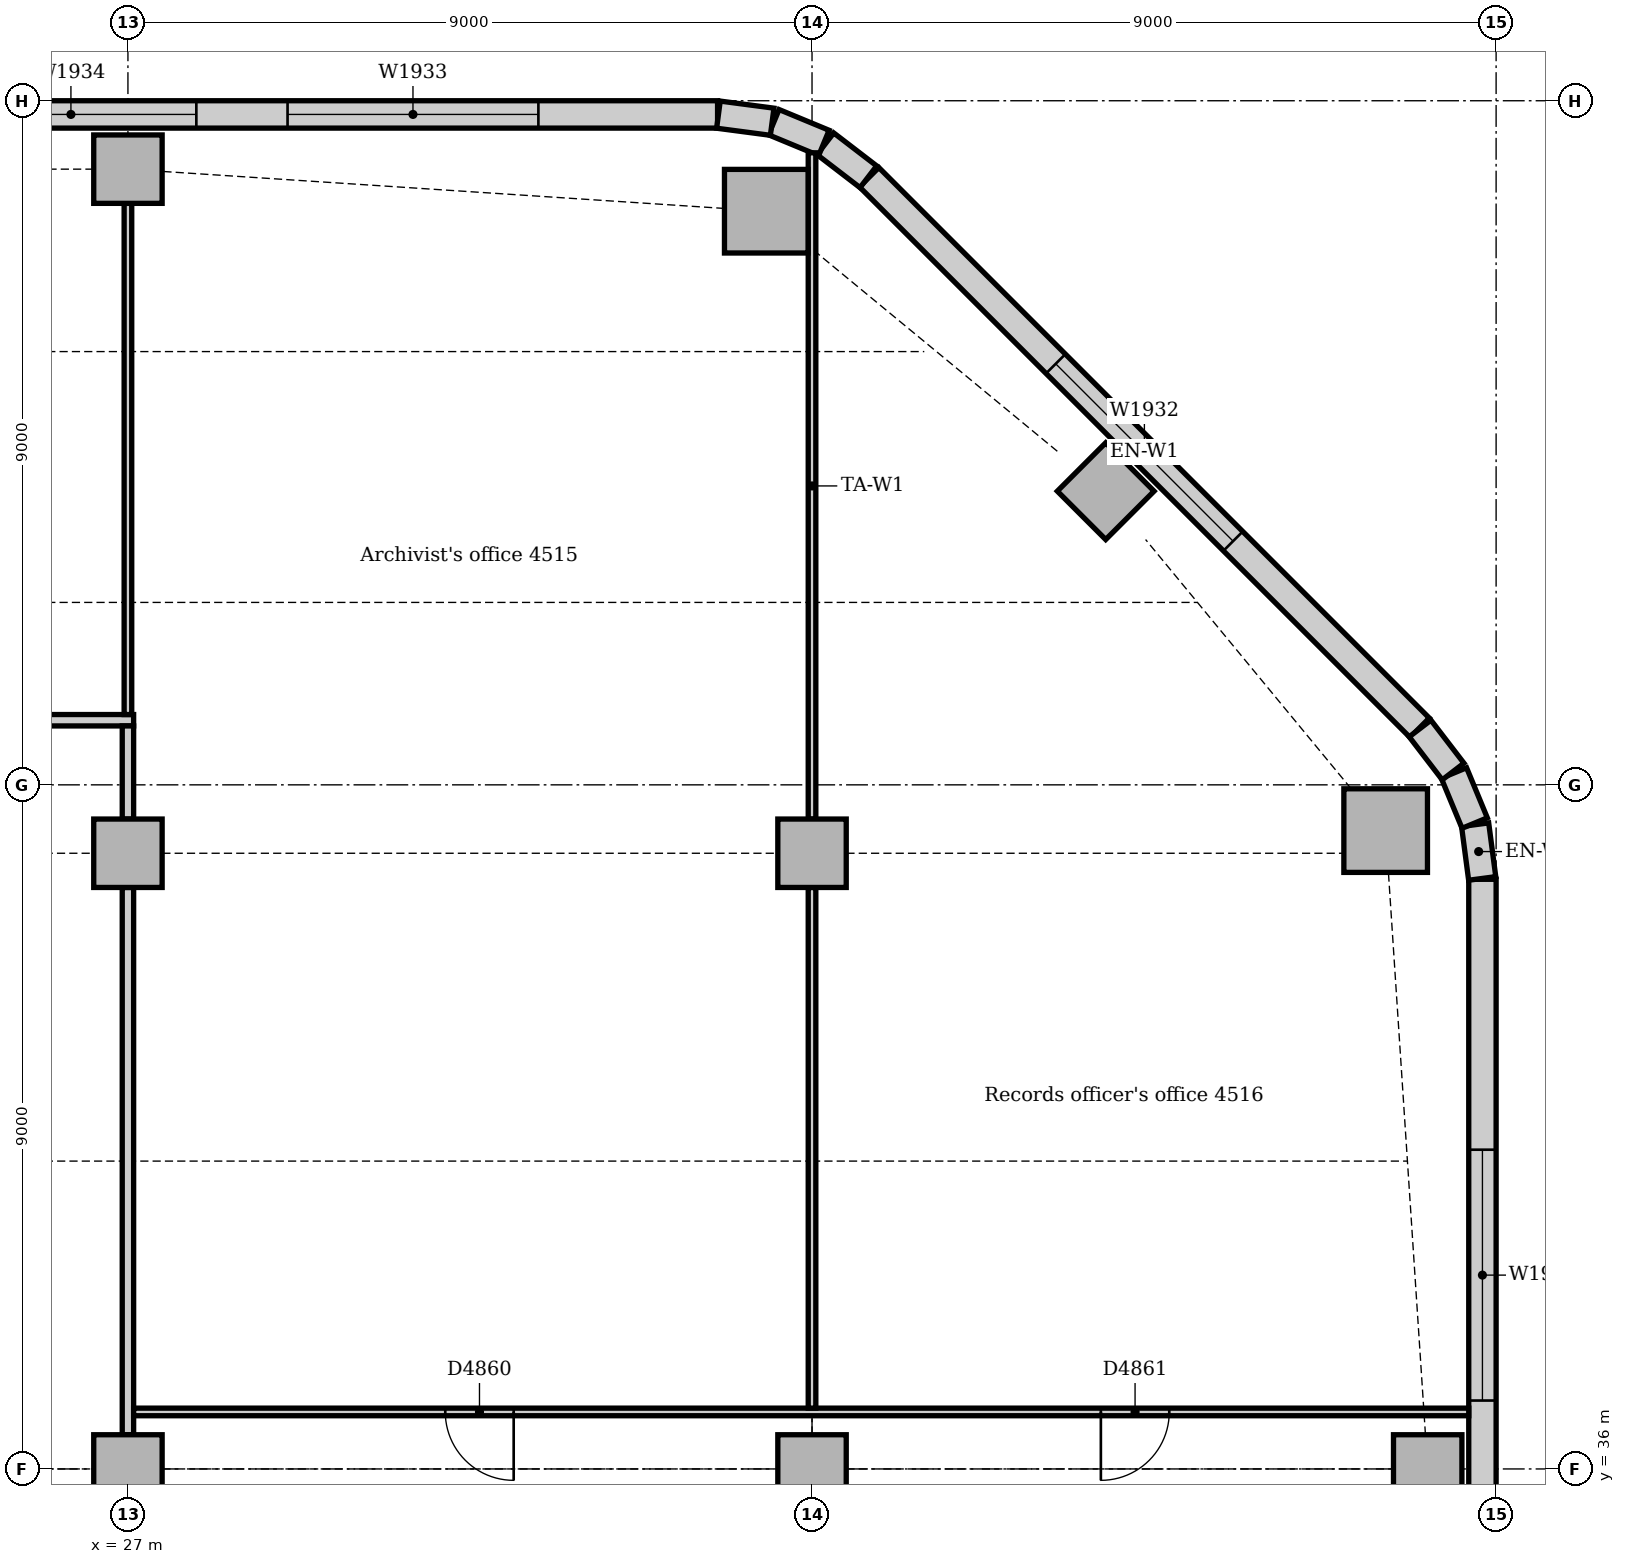
"""IFC4 building model, lengths in metres.
Left out: names, types, materials, properties, quantities, classifications, styles, units other than length and angle.
Written with IfcOpenShell. Run it as: python <this file> out.ifc"""

import sys

from ifc_helpers import new_model, si_unit, direction, frame, frame_2d, origin, origin_2d, place, context, subcontext, project, spatial, rectangle, extrude, element, fill, save


model = new_model("IFC4")
c1 = context("Model", 3, precision=1e-05, world=origin(), true_north=direction((0.0, 1.0)))
c2 = subcontext(c1, "Body", "Model", "MODEL_VIEW")
j1 = project(units=[si_unit("LENGTHUNIT", "METRE"), si_unit("PLANEANGLEUNIT", "RADIAN")], contexts=[c1])
p1 = place(None, origin())
s1 = spatial("IfcSite", under=j1, at=p1, CompositionType="ELEMENT")
p2 = place(p1, origin())
s2 = spatial("IfcBuilding", under=s1, at=p2, CompositionType="ELEMENT")
p3 = place(p2, frame((0.0, 0.0, 189.0)))
s3 = spatial("IfcBuildingStorey", under=s2, at=p3, CompositionType="ELEMENT", Elevation=189.0)
for number, where, z_axis, x_axis in (
    (1, (43.547, 44.398, 0.0), (0.0, 0.0, 1.0), (1.0, 0.0, 0.0)),
    (2, (35.398, 52.547, 0.0), (0.0, 0.0, 1.0), (1.0, 0.0, 0.0)),
):
    element("IfcColumn", number, at=place(p3, frame(where, z_axis=z_axis, x_axis=x_axis)), inside=s3, PredefinedType="COLUMN", context=c2, shape_type="SweptSolid", body=[
        extrude(rectangle(XDim=1.1, YDim=1.1, at=origin_2d()), origin(), (0.0, 0.0, 1.0), 3.7),
    ])
for number, where, z_axis, x_axis in (
    (3, (44.1, 36.0, 0.0), (0.0, 0.0, 1.0), (1.0, 0.0, 0.0)),
    (4, (39.864, 48.864, 0.0), (0.0, 0.0, 1.0), (0.707, 0.707, 0.0)),
    (5, (27.0, 53.1, 0.0), (0.0, 0.0, 1.0), (1.0, 0.0, 0.0)),
    (6, (27.0, 36.0, 0.0), (0.0, 0.0, 1.0), (1.0, 0.0, 0.0)),
    (7, (27.0, 44.1, 0.0), (0.0, 0.0, 1.0), (1.0, 0.0, 0.0)),
    (8, (36.0, 36.0, 0.0), (0.0, 0.0, 1.0), (1.0, 0.0, 0.0)),
    (9, (36.0, 44.1, 0.0), (0.0, 0.0, 1.0), (1.0, 0.0, 0.0)),
):
    element("IfcColumn", number, at=place(p3, frame(where, z_axis=z_axis, x_axis=x_axis)), inside=s3, PredefinedType="COLUMN", context=c2, shape_type="SweptSolid", body=[
        extrude(rectangle(XDim=0.9, YDim=0.9, at=origin_2d()), origin(), (0.0, 0.0, 1.0), 3.7),
    ])
p4 = place(p3, frame((44.82, 19.243, 0.0), z_axis=(0.0, 0.0, 1.0), x_axis=(0.0, 1.0, 0.0)))
e10 = element("IfcWall", 10, at=p4, inside=s3, PredefinedType="STANDARD", context=c2, shape_type="SweptSolid", body=[
    extrude(rectangle(XDim=24.515, YDim=0.36, at=frame_2d((12.257, 0.0))), origin(), (0.0, 0.0, 1.0), 3.7),
])
p5 = place(p4, frame((3.507, 0.0, 0.9)))
e11 = element("IfcOpeningElement", 11, at=p5, cuts=e10, PredefinedType="OPENING", context=c2, shape_type="SweptSolid", body=[
    extrude(rectangle(XDim=3.3, YDim=1.6, at=frame_2d((1.65, 0.8))), frame((0.0, 0.19, 0.0), z_axis=(0.0, -1.0, 0.0), x_axis=(1.0, 0.0, 0.0)), (0.0, 0.0, 1.0), 0.38),
])
p6 = place(p4, frame((8.357, 0.0, 0.9)))
e12 = element("IfcOpeningElement", 12, at=p6, cuts=e10, PredefinedType="OPENING", context=c2, shape_type="SweptSolid", body=[
    extrude(rectangle(XDim=3.3, YDim=1.6, at=frame_2d((1.65, 0.8))), frame((0.0, 0.19, 0.0), z_axis=(0.0, -1.0, 0.0), x_axis=(1.0, 0.0, 0.0)), (0.0, 0.0, 1.0), 0.38),
])
p7 = place(p4, frame((12.857, 0.0, 0.9)))
e13 = element("IfcOpeningElement", 13, at=p7, cuts=e10, PredefinedType="OPENING", context=c2, shape_type="SweptSolid", body=[
    extrude(rectangle(XDim=3.3, YDim=1.6, at=frame_2d((1.65, 0.8))), frame((0.0, 0.19, 0.0), z_axis=(0.0, -1.0, 0.0), x_axis=(1.0, 0.0, 0.0)), (0.0, 0.0, 1.0), 0.38),
])
p8 = place(p4, frame((17.657, 0.0, 0.9)))
e14 = element("IfcOpeningElement", 14, at=p8, cuts=e10, PredefinedType="OPENING", context=c2, shape_type="SweptSolid", body=[
    extrude(rectangle(XDim=3.3, YDim=1.6, at=frame_2d((1.65, 0.8))), frame((0.0, 0.19, 0.0), z_axis=(0.0, -1.0, 0.0), x_axis=(1.0, 0.0, 0.0)), (0.0, 0.0, 1.0), 0.38),
])
p9 = place(p3, frame((43.994, 45.751, 0.0), z_axis=(0.0, 0.0, 1.0), x_axis=(-0.707106781187, 0.707106781187, 0.0)))
e15 = element("IfcWall", 15, at=p9, inside=s3, PredefinedType="STANDARD", context=c2, shape_type="SweptSolid", body=[
    extrude(rectangle(XDim=10.243, YDim=0.36, at=frame_2d((5.121, 0.0))), origin(), (0.0, 0.0, 1.0), 3.7),
])
p10 = place(p9, frame((3.471, 0.0, 0.9)))
e16 = element("IfcOpeningElement", 16, at=p10, cuts=e15, PredefinedType="OPENING", context=c2, shape_type="SweptSolid", body=[
    extrude(rectangle(XDim=3.3, YDim=1.6, at=frame_2d((1.65, 0.8))), frame((0.0, 0.19, 0.0), z_axis=(0.0, -1.0, 0.0), x_axis=(1.0, 0.0, 0.0)), (0.0, 0.0, 1.0), 0.38),
])
p11 = place(p3, frame((34.757, 53.82, 0.0), z_axis=(0.0, 0.0, 1.0), x_axis=(-1.0, 0.0, 0.0)))
e17 = element("IfcWall", 17, at=p11, inside=s3, PredefinedType="STANDARD", context=c2, shape_type="SweptSolid", body=[
    extrude(rectangle(XDim=30.515, YDim=0.36, at=frame_2d((15.257, 0.0))), origin(), (0.0, 0.0, 1.0), 3.7),
])
p12 = place(p11, frame((2.357, 0.0, 0.9)))
e18 = element("IfcOpeningElement", 18, at=p12, cuts=e17, PredefinedType="OPENING", context=c2, shape_type="SweptSolid", body=[
    extrude(rectangle(XDim=3.3, YDim=1.6, at=frame_2d((1.65, 0.8))), frame((0.0, 0.19, 0.0), z_axis=(0.0, -1.0, 0.0), x_axis=(1.0, 0.0, 0.0)), (0.0, 0.0, 1.0), 0.38),
])
p13 = place(p11, frame((6.857, 0.0, 0.9)))
e19 = element("IfcOpeningElement", 19, at=p13, cuts=e17, PredefinedType="OPENING", context=c2, shape_type="SweptSolid", body=[
    extrude(rectangle(XDim=3.3, YDim=1.6, at=frame_2d((1.65, 0.8))), frame((0.0, 0.19, 0.0), z_axis=(0.0, -1.0, 0.0), x_axis=(1.0, 0.0, 0.0)), (0.0, 0.0, 1.0), 0.38),
])
p14 = place(p11, frame((11.357, 0.0, 0.9)))
e20 = element("IfcOpeningElement", 20, at=p14, cuts=e17, PredefinedType="OPENING", context=c2, shape_type="SweptSolid", body=[
    extrude(rectangle(XDim=3.3, YDim=1.6, at=frame_2d((1.65, 0.8))), frame((0.0, 0.19, 0.0), z_axis=(0.0, -1.0, 0.0), x_axis=(1.0, 0.0, 0.0)), (0.0, 0.0, 1.0), 0.38),
])
p15 = place(p11, frame((15.857, 0.0, 0.9)))
e21 = element("IfcOpeningElement", 21, at=p15, cuts=e17, PredefinedType="OPENING", context=c2, shape_type="SweptSolid", body=[
    extrude(rectangle(XDim=3.3, YDim=1.6, at=frame_2d((1.65, 0.8))), frame((0.0, 0.19, 0.0), z_axis=(0.0, -1.0, 0.0), x_axis=(1.0, 0.0, 0.0)), (0.0, 0.0, 1.0), 0.38),
])
p16 = place(p11, frame((21.457, 0.0, 0.9)))
e22 = element("IfcOpeningElement", 22, at=p16, cuts=e17, PredefinedType="OPENING", context=c2, shape_type="SweptSolid", body=[
    extrude(rectangle(XDim=1.8, YDim=1.6, at=frame_2d((0.9, 0.8))), frame((0.0, 0.19, 0.0), z_axis=(0.0, -1.0, 0.0), x_axis=(1.0, 0.0, 0.0)), (0.0, 0.0, 1.0), 0.38),
])
p17 = place(p11, frame((24.857, 0.0, 0.9)))
e23 = element("IfcOpeningElement", 23, at=p17, cuts=e17, PredefinedType="OPENING", context=c2, shape_type="SweptSolid", body=[
    extrude(rectangle(XDim=3.3, YDim=1.6, at=frame_2d((1.65, 0.8))), frame((0.0, 0.19, 0.0), z_axis=(0.0, -1.0, 0.0), x_axis=(1.0, 0.0, 0.0)), (0.0, 0.0, 1.0), 0.38),
])
for number, where, z_axis, x_axis in (
    (24, (44.817, 43.769, 0.0), (0.0, 0.0, 1.0), (-0.131, 0.991, 0.0)),
    (25, (44.718, 44.497, 0.0), (0.0, 0.0, 1.0), (-0.383, 0.924, 0.0)),
):
    element("IfcWall", number, at=place(p3, frame(where, z_axis=z_axis, x_axis=x_axis)), inside=s3, PredefinedType="STANDARD", context=c2, shape_type="SweptSolid", body=[
        extrude(rectangle(XDim=0.713, YDim=0.36, at=frame_2d((0.356, 0.0))), origin(), (0.0, 0.0, 1.0), 3.7),
    ])
for number, where, z_axis, x_axis in (
    (26, (44.434, 45.175, 0.0), (0.0, 0.0, 1.0), (-0.609, 0.793, 0.0)),
    (27, (36.741, 53.0, 0.0), (0.0, 0.0, 1.0), (-0.793, 0.609, 0.0)),
):
    element("IfcWall", number, at=place(p3, frame(where, z_axis=z_axis, x_axis=x_axis)), inside=s3, PredefinedType="STANDARD", context=c2, shape_type="SweptSolid", body=[
        extrude(rectangle(XDim=0.713, YDim=0.36, at=frame_2d((0.357, 0.0))), origin(), (0.0, 0.0, 1.0), 3.7),
    ])
for number, where, z_axis, x_axis in (
    (28, (36.156, 53.445, 0.0), (0.0, 0.0, 1.0), (-0.924, 0.383, 0.0)),
    (29, (35.476, 53.724, 0.0), (0.0, 0.0, 1.0), (-0.991, 0.131, 0.0)),
):
    element("IfcWall", number, at=place(p3, frame(where, z_axis=z_axis, x_axis=x_axis)), inside=s3, PredefinedType="STANDARD", context=c2, shape_type="SweptSolid", body=[
        extrude(rectangle(XDim=0.713, YDim=0.36, at=frame_2d((0.356, 0.0))), origin(), (0.0, 0.0, 1.0), 3.7),
    ])
p18 = place(p3, frame((1.903, 45.85, 0.0), z_axis=(0.0, 0.0, 1.0), x_axis=(1.0, 0.0, 0.0)))
e30 = element("IfcWall", 30, at=p18, inside=s3, PredefinedType="PARTITIONING", context=c2, shape_type="SweptSolid", body=[
    extrude(rectangle(XDim=25.172, YDim=0.15, at=frame_2d((12.586, 0.0))), origin(), (0.0, 0.0, 1.0), 3.7),
])
p19 = place(p18, frame((5.4, 0.0, 0.0)))
e31 = element("IfcOpeningElement", 31, at=p19, cuts=e30, PredefinedType="OPENING", context=c2, shape_type="SweptSolid", body=[
    extrude(rectangle(XDim=0.9, YDim=2.1, at=frame_2d((0.45, 1.05))), frame((0.0, 0.085, 0.0), z_axis=(0.0, -1.0, 0.0), x_axis=(1.0, 0.0, 0.0)), (0.0, 0.0, 1.0), 0.17),
])
p20 = place(p18, frame((15.647, 0.0, 0.0)))
e32 = element("IfcOpeningElement", 32, at=p20, cuts=e30, PredefinedType="OPENING", context=c2, shape_type="SweptSolid", body=[
    extrude(rectangle(XDim=0.9, YDim=2.1, at=frame_2d((0.45, 1.05))), frame((0.0, 0.085, 0.0), z_axis=(0.0, -1.0, 0.0), x_axis=(1.0, 0.0, 0.0)), (0.0, 0.0, 1.0), 0.17),
])
p21 = place(p3, frame((27.0, 36.45, 0.0), z_axis=(0.0, 0.0, 1.0), x_axis=(0.0, 1.0, 0.0)))
e33 = element("IfcWall", 33, at=p21, inside=s3, PredefinedType="PARTITIONING", context=c2, shape_type="SweptSolid", body=[
    extrude(rectangle(XDim=7.2, YDim=0.15, at=frame_2d((3.6, 0.0))), origin(), (0.0, 0.0, 1.0), 3.212),
])
p22 = place(p3, frame((27.0, 44.55, 0.0), z_axis=(0.0, 0.0, 1.0), x_axis=(0.0, 1.0, 0.0)))
e34 = element("IfcWall", 34, at=p22, inside=s3, PredefinedType="PARTITIONING", context=c2, shape_type="SweptSolid", body=[
    extrude(rectangle(XDim=1.225, YDim=0.15, at=frame_2d((0.613, 0.0))), origin(), (0.0, 0.0, 1.0), 3.212),
])
p23 = place(p3, frame((27.075, 36.75, 0.0), z_axis=(0.0, 0.0, 1.0), x_axis=(1.0, 0.0, 0.0)))
e35 = element("IfcWall", 35, at=p23, inside=s3, PredefinedType="PARTITIONING", context=c2, shape_type="SweptSolid", body=[
    extrude(rectangle(XDim=17.565, YDim=0.1, at=frame_2d((8.783, 0.0))), origin(), (0.0, 0.0, 1.0), 3.7),
])
p24 = place(p23, frame((4.1, 0.0, 0.0)))
e36 = element("IfcOpeningElement", 36, at=p24, cuts=e35, PredefinedType="OPENING", context=c2, shape_type="SweptSolid", body=[
    extrude(rectangle(XDim=0.9, YDim=2.1, at=frame_2d((0.45, 1.05))), frame((0.0, 0.06, 0.0), z_axis=(0.0, -1.0, 0.0), x_axis=(1.0, 0.0, 0.0)), (0.0, 0.0, 1.0), 0.12),
])
p25 = place(p23, frame((12.725, 0.0, 0.0)))
e37 = element("IfcOpeningElement", 37, at=p25, cuts=e35, PredefinedType="OPENING", context=c2, shape_type="SweptSolid", body=[
    extrude(rectangle(XDim=0.9, YDim=2.1, at=frame_2d((0.45, 1.05))), frame((0.0, 0.06, 0.0), z_axis=(0.0, -1.0, 0.0), x_axis=(1.0, 0.0, 0.0)), (0.0, 0.0, 1.0), 0.12),
])
p26 = place(p3, frame((36.0, 36.8, 0.0), z_axis=(0.0, 0.0, 1.0), x_axis=(0.0, 1.0, 0.0)))
e38 = element("IfcWall", 38, at=p26, inside=s3, PredefinedType="PARTITIONING", context=c2, shape_type="SweptSolid", body=[
    extrude(rectangle(XDim=6.85, YDim=0.1, at=frame_2d((3.425, 0.0))), origin(), (0.0, 0.0, 1.0), 3.212),
])
p27 = place(p3, frame((36.0, 44.55, 0.0), z_axis=(0.0, 0.0, 1.0), x_axis=(0.0, 1.0, 0.0)))
e39 = element("IfcWall", 39, at=p27, inside=s3, PredefinedType="PARTITIONING", context=c2, shape_type="SweptSolid", body=[
    extrude(rectangle(XDim=8.765, YDim=0.1, at=frame_2d((4.383, 0.0))), origin(), (0.0, 0.0, 1.0), 3.212),
])
p28 = place(p3, frame((27.0, 45.925, 0.0), z_axis=(0.0, 0.0, 1.0), x_axis=(0.0, 1.0, 0.0)))
e40 = element("IfcWall", 40, at=p28, inside=s3, PredefinedType="PARTITIONING", context=c2, shape_type="SweptSolid", body=[
    extrude(rectangle(XDim=6.725, YDim=0.1, at=frame_2d((3.362, 0.0))), origin(), (0.0, 0.0, 1.0), 3.212),
])
p29 = place(p8, origin())
e41 = element("IfcWindow", 41, at=p29, inside=s3, PartitioningType="SINGLE_PANEL", PredefinedType="WINDOW", context=c2, shape_type="SweptSolid", body=[
    extrude(rectangle(XDim=3.3, YDim=1.6, at=frame_2d((1.65, 0.8))), frame((0.0, 0.13, 0.0), z_axis=(0.0, -1.0, 0.0), x_axis=(1.0, 0.0, 0.0)), (0.0, 0.0, 1.0), 0.06),
])
fill(e14, e41)
p30 = place(p10, origin())
e42 = element("IfcWindow", 42, at=p30, inside=s3, PartitioningType="SINGLE_PANEL", PredefinedType="WINDOW", context=c2, shape_type="SweptSolid", body=[
    extrude(rectangle(XDim=3.3, YDim=1.6, at=frame_2d((1.65, 0.8))), frame((0.0, 0.13, 0.0), z_axis=(0.0, -1.0, 0.0), x_axis=(1.0, 0.0, 0.0)), (0.0, 0.0, 1.0), 0.06),
])
fill(e16, e42)
p31 = place(p12, origin())
e43 = element("IfcWindow", 43, at=p31, inside=s3, PartitioningType="SINGLE_PANEL", PredefinedType="WINDOW", context=c2, shape_type="SweptSolid", body=[
    extrude(rectangle(XDim=3.3, YDim=1.6, at=frame_2d((1.65, 0.8))), frame((0.0, 0.13, 0.0), z_axis=(0.0, -1.0, 0.0), x_axis=(1.0, 0.0, 0.0)), (0.0, 0.0, 1.0), 0.06),
])
fill(e18, e43)
p32 = place(p13, origin())
e44 = element("IfcWindow", 44, at=p32, inside=s3, PartitioningType="SINGLE_PANEL", PredefinedType="WINDOW", context=c2, shape_type="SweptSolid", body=[
    extrude(rectangle(XDim=3.3, YDim=1.6, at=frame_2d((1.65, 0.8))), frame((0.0, 0.13, 0.0), z_axis=(0.0, -1.0, 0.0), x_axis=(1.0, 0.0, 0.0)), (0.0, 0.0, 1.0), 0.06),
])
fill(e19, e44)
p33 = place(p24, frame((0.9, 0.0, 0.0), z_axis=(0.0, 0.0, 1.0), x_axis=(-1.0, 0.0, 0.0)))
e45 = element("IfcDoor", 45, at=p33, inside=s3, OperationType="SINGLE_SWING_LEFT", PredefinedType="DOOR", context=c2, shape_type="SweptSolid", body=[
    extrude(rectangle(XDim=0.9, YDim=2.1, at=frame_2d((0.45, 1.05))), frame((0.0, 0.025, 0.0), z_axis=(0.0, -1.0, 0.0), x_axis=(1.0, 0.0, 0.0)), (0.0, 0.0, 1.0), 0.05),
])
fill(e36, e45)
p34 = place(p25, frame((0.9, 0.0, 0.0), z_axis=(0.0, 0.0, 1.0), x_axis=(-1.0, 0.0, 0.0)))
e46 = element("IfcDoor", 46, at=p34, inside=s3, OperationType="SINGLE_SWING_RIGHT", PredefinedType="DOOR", context=c2, shape_type="SweptSolid", body=[
    extrude(rectangle(XDim=0.9, YDim=2.1, at=frame_2d((0.45, 1.05))), frame((0.0, 0.025, 0.0), z_axis=(0.0, -1.0, 0.0), x_axis=(1.0, 0.0, 0.0)), (0.0, 0.0, 1.0), 0.05),
])
fill(e37, e46)
save(model, sys.argv[1])
